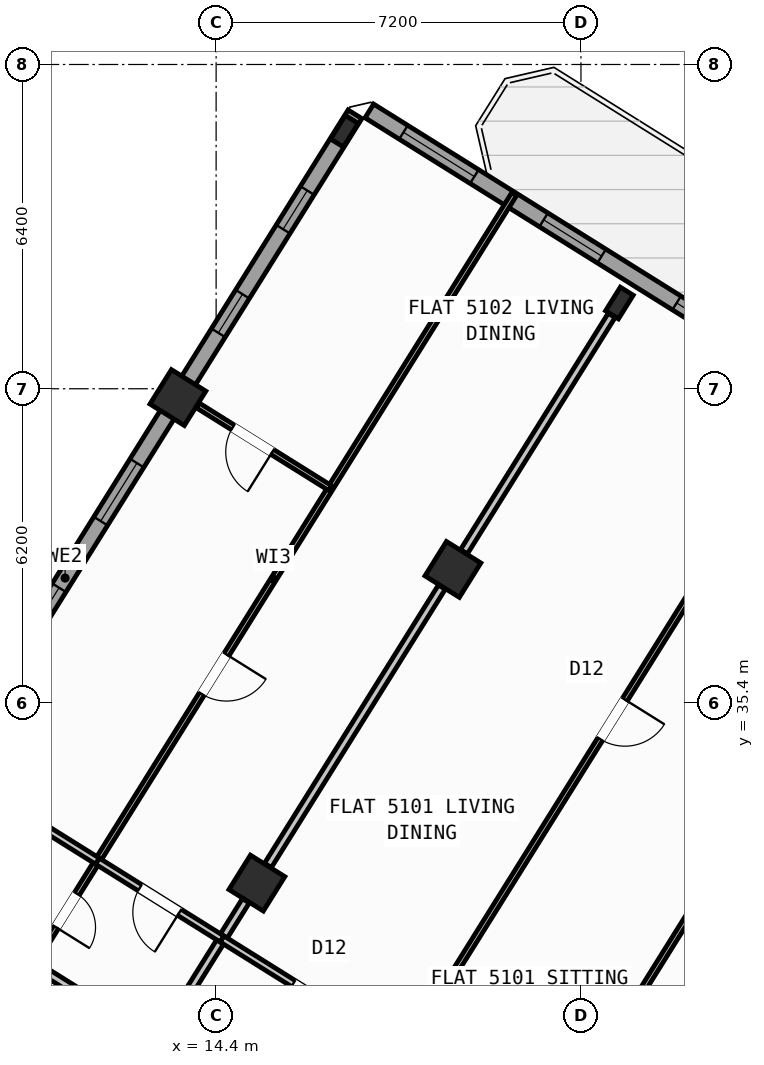
"""IFC4 building model, lengths in metres.
Left out: names, types, materials, properties, quantities, classifications, styles, units other than length and angle.
Written with IfcOpenShell. Run it as: python <this file> out.ifc"""

import sys

from ifc_helpers import new_model, si_unit, direction, frame, frame_2d, origin, origin_2d, place, context, subcontext, project, spatial, rectangle, hollow_rectangle, i_section, extrude, source, transform, mapped, element, fill, save


model = new_model("IFC4")
c1 = context("Model", 3, precision=1e-05, world=origin(), true_north=direction((0.0, 1.0)))
c2 = subcontext(c1, "Body", "Model", "MODEL_VIEW")
j1 = project(units=[si_unit("LENGTHUNIT", "METRE"), si_unit("PLANEANGLEUNIT", "RADIAN")], contexts=[c1])
p1 = place(None, origin())
s1 = spatial("IfcSite", under=j1, at=p1, CompositionType="ELEMENT")
p2 = place(p1, origin())
s2 = spatial("IfcBuilding", under=s1, at=p2, CompositionType="ELEMENT")
p3 = place(p2, frame((0.0, 0.0, 204.0)))
s3 = spatial("IfcBuildingStorey", under=s2, at=p3, CompositionType="ELEMENT", Elevation=204.0)
m1 = source(origin(), c2, "Body", "SweptSolid", [
    extrude(i_section(OverallWidth=0.3, OverallDepth=0.55, WebThickness=0.015, FlangeThickness=0.029, at=origin_2d()), origin(), (0.0, 0.0, 1.0), 3.6),
])
p4 = place(p3, frame((22.358, 43.292, 0.0), z_axis=(0.0, 0.0, 1.0), x_axis=(-0.848048096156, 0.529919264233, 0.0)))
e1 = element("IfcColumn", 1, at=p4, inside=s3, PredefinedType="COLUMN", context=c2, shape_type="MappedRepresentation", body=[
    mapped(m1, transform((0.0, 0.0, 0.0), scale=1.0)),
])
m2 = source(origin(), c2, "Body", "SweptSolid", [
    extrude(hollow_rectangle(XDim=0.8, YDim=0.8, WallThickness=0.032, at=origin_2d()), origin(), (0.0, 0.0, 1.0), 3.6),
])
for number, where, z_axis, x_axis in (
    (2, (19.073, 38.034, 0.0), (0.0, 0.0, 1.0), (-0.848, 0.53, 0.0)),
    (3, (15.205, 31.844, 0.0), (0.0, 0.0, 1.0), (-0.848, 0.53, 0.0)),
):
    element("IfcColumn", number, at=place(p3, frame(where, z_axis=z_axis, x_axis=x_axis)), inside=s3, PredefinedType="COLUMN", context=c2, shape_type="MappedRepresentation", body=[
        mapped(m2, transform((0.0, 0.0, 0.0), scale=1.0)),
    ])
p5 = place(p3, frame((16.931, 46.684, 0.0), z_axis=(0.0, 0.0, 1.0), x_axis=(-0.848048096156, 0.529919264233, 0.0)))
e4 = element("IfcColumn", 4, at=p5, inside=s3, PredefinedType="COLUMN", context=c2, shape_type="MappedRepresentation", body=[
    mapped(m1, transform((0.0, 0.0, 0.0), scale=1.0)),
])
p6 = place(p3, frame((13.646, 41.426, 0.0), z_axis=(0.0, 0.0, 1.0), x_axis=(-0.848048096156, 0.529919264233, 0.0)))
e5 = element("IfcColumn", 5, at=p6, inside=s3, PredefinedType="COLUMN", context=c2, shape_type="MappedRepresentation", body=[
    mapped(m2, transform((0.0, 0.0, 0.0), scale=1.0)),
])
p7 = place(p3, frame((5.7, 28.71, 0.0), z_axis=(0.0, 0.0, 1.0), x_axis=(0.529923711467, 0.8480453172, 0.0)))
e6 = element("IfcWall", 6, at=p7, inside=s3, PredefinedType="STANDARD", context=c2, shape_type="SweptSolid", body=[
    extrude(rectangle(XDim=21.587, YDim=0.32, at=frame_2d((10.794, 0.0))), origin(), (0.0, 0.0, 1.0), 2.825),
])
p8 = place(p7, frame((4.749, 0.0, 1.0)))
e7 = element("IfcOpeningElement", 7, at=p8, cuts=e6, PredefinedType="OPENING", context=c2, shape_type="SweptSolid", body=[
    extrude(rectangle(XDim=0.9, YDim=1.25, at=frame_2d((0.45, 0.625))), frame((0.0, 0.17, 0.0), z_axis=(0.0, -1.0, 0.0), x_axis=(1.0, 0.0, 0.0)), (0.0, 0.0, 1.0), 0.34),
])
p9 = place(p7, frame((9.219, 0.0, 0.9)))
e8 = element("IfcOpeningElement", 8, at=p9, cuts=e6, PredefinedType="OPENING", context=c2, shape_type="SweptSolid", body=[
    extrude(rectangle(XDim=1.35, YDim=1.45, at=frame_2d((0.675, 0.725))), frame((0.0, 0.17, 0.0), z_axis=(0.0, -1.0, 0.0), x_axis=(1.0, 0.0, 0.0)), (0.0, 0.0, 1.0), 0.34),
])
p10 = place(p7, frame((12.119, 0.0, 0.9)))
e9 = element("IfcOpeningElement", 9, at=p10, cuts=e6, PredefinedType="OPENING", context=c2, shape_type="SweptSolid", body=[
    extrude(rectangle(XDim=1.35, YDim=1.45, at=frame_2d((0.675, 0.725))), frame((0.0, 0.17, 0.0), z_axis=(0.0, -1.0, 0.0), x_axis=(1.0, 0.0, 0.0)), (0.0, 0.0, 1.0), 0.34),
])
p11 = place(p7, frame((16.5, 0.0, 1.0)))
e10 = element("IfcOpeningElement", 10, at=p11, cuts=e6, PredefinedType="OPENING", context=c2, shape_type="SweptSolid", body=[
    extrude(rectangle(XDim=0.9, YDim=1.25, at=frame_2d((0.45, 0.625))), frame((0.0, 0.17, 0.0), z_axis=(0.0, -1.0, 0.0), x_axis=(1.0, 0.0, 0.0)), (0.0, 0.0, 1.0), 0.34),
])
p12 = place(p7, frame((18.913, 0.0, 1.0)))
e11 = element("IfcOpeningElement", 11, at=p12, cuts=e6, PredefinedType="OPENING", context=c2, shape_type="SweptSolid", body=[
    extrude(rectangle(XDim=0.9, YDim=1.25, at=frame_2d((0.45, 0.625))), frame((0.0, 0.17, 0.0), z_axis=(0.0, -1.0, 0.0), x_axis=(1.0, 0.0, 0.0)), (0.0, 0.0, 1.0), 0.34),
])
p13 = place(p3, frame((17.424, 47.083, 0.0), z_axis=(0.0, 0.0, 1.0), x_axis=(0.848049927979, -0.529916332693, 0.0)))
e12 = element("IfcWall", 12, at=p13, inside=s3, PredefinedType="STANDARD", context=c2, shape_type="SweptSolid", body=[
    extrude(rectangle(XDim=29.223, YDim=0.32, at=frame_2d((14.612, 0.0))), origin(), (0.0, 0.0, 1.0), 3.35),
])
p14 = place(p13, frame((8.799, 0.0, 0.0)))
e13 = element("IfcOpeningElement", 13, at=p14, cuts=e12, PredefinedType="OPENING", context=c2, shape_type="SweptSolid", body=[
    extrude(rectangle(XDim=1.05, YDim=2.15, at=frame_2d((0.525, 1.075))), frame((0.0, 0.17, 0.0), z_axis=(0.0, -1.0, 0.0), x_axis=(1.0, 0.0, 0.0)), (0.0, 0.0, 1.0), 0.34),
])
p15 = place(p13, frame((0.794, 0.0, 0.9)))
e14 = element("IfcOpeningElement", 14, at=p15, cuts=e12, PredefinedType="OPENING", context=c2, shape_type="SweptSolid", body=[
    extrude(rectangle(XDim=1.65, YDim=1.45, at=frame_2d((0.825, 0.725))), frame((0.0, 0.17, 0.0), z_axis=(0.0, -1.0, 0.0), x_axis=(1.0, 0.0, 0.0)), (0.0, 0.0, 1.0), 0.34),
])
p16 = place(p13, frame((4.056, 0.0, 0.9)))
e15 = element("IfcOpeningElement", 15, at=p16, cuts=e12, PredefinedType="OPENING", context=c2, shape_type="SweptSolid", body=[
    extrude(rectangle(XDim=1.35, YDim=1.45, at=frame_2d((0.675, 0.725))), frame((0.0, 0.17, 0.0), z_axis=(0.0, -1.0, 0.0), x_axis=(1.0, 0.0, 0.0)), (0.0, 0.0, 1.0), 0.34),
])
p17 = place(p13, frame((7.151, 0.0, 1.0)))
e16 = element("IfcOpeningElement", 16, at=p17, cuts=e12, PredefinedType="OPENING", context=c2, shape_type="SweptSolid", body=[
    extrude(rectangle(XDim=0.9, YDim=1.25, at=frame_2d((0.45, 0.625))), frame((0.0, 0.17, 0.0), z_axis=(0.0, -1.0, 0.0), x_axis=(1.0, 0.0, 0.0)), (0.0, 0.0, 1.0), 0.34),
])
p18 = place(p13, frame((14.612, 0.0, 1.0)))
e17 = element("IfcOpeningElement", 17, at=p18, cuts=e12, PredefinedType="OPENING", context=c2, shape_type="SweptSolid", body=[
    extrude(rectangle(XDim=0.9, YDim=1.25, at=frame_2d((0.45, 0.625))), frame((0.0, 0.17, 0.0), z_axis=(0.0, -1.0, 0.0), x_axis=(1.0, 0.0, 0.0)), (0.0, 0.0, 1.0), 0.34),
])
p19 = place(p13, frame((17.254, 0.0, 1.0)))
e18 = element("IfcOpeningElement", 18, at=p19, cuts=e12, PredefinedType="OPENING", context=c2, shape_type="SweptSolid", body=[
    extrude(rectangle(XDim=0.9, YDim=1.25, at=frame_2d((0.45, 0.625))), frame((0.0, 0.17, 0.0), z_axis=(0.0, -1.0, 0.0), x_axis=(1.0, 0.0, 0.0)), (0.0, 0.0, 1.0), 0.34),
])
p20 = place(p13, frame((21.139, 0.0, 0.9)))
e19 = element("IfcOpeningElement", 19, at=p20, cuts=e12, PredefinedType="OPENING", context=c2, shape_type="SweptSolid", body=[
    extrude(rectangle(XDim=1.35, YDim=1.45, at=frame_2d((0.675, 0.725))), frame((0.0, 0.17, 0.0), z_axis=(0.0, -1.0, 0.0), x_axis=(1.0, 0.0, 0.0)), (0.0, 0.0, 1.0), 0.34),
])
p21 = place(p13, frame((25.778, 0.0, 0.9)))
e20 = element("IfcOpeningElement", 20, at=p21, cuts=e12, PredefinedType="OPENING", context=c2, shape_type="SweptSolid", body=[
    extrude(rectangle(XDim=1.35, YDim=1.45, at=frame_2d((0.675, 0.725))), frame((0.0, 0.17, 0.0), z_axis=(0.0, -1.0, 0.0), x_axis=(1.0, 0.0, 0.0)), (0.0, 0.0, 1.0), 0.34),
])
p22 = place(p3, frame((31.239, 38.274, 0.0), z_axis=(0.0, 0.0, 1.0), x_axis=(-0.529918119251, -0.84804881162, 0.0)))
e21 = element("IfcWall", 21, at=p22, inside=s3, PredefinedType="PARTITIONING", context=c2, shape_type="SweptSolid", body=[
    extrude(rectangle(XDim=17.65, YDim=0.16, at=frame_2d((8.825, 0.0))), origin(), (0.0, 0.0, 1.0), 3.34),
])
p23 = place(p3, frame((21.885, 23.306, 0.0), z_axis=(0.0, 0.0, 1.0), x_axis=(-0.848052408131, 0.529912363569, 0.0)))
e22 = element("IfcWall", 22, at=p23, inside=s3, PredefinedType="PARTITIONING", context=c2, shape_type="SweptSolid", body=[
    extrude(rectangle(XDim=16.73, YDim=0.16, at=frame_2d((8.365, 0.0))), origin(), (0.0, 0.0, 1.0), 3.34),
])
p24 = place(p23, frame((7.57, 0.0, 0.0)))
e23 = element("IfcOpeningElement", 23, at=p24, cuts=e22, PredefinedType="OPENING", context=c2, shape_type="SweptSolid", body=[
    extrude(rectangle(XDim=1.0, YDim=2.1, at=frame_2d((0.5, 1.05))), frame((0.0, 0.09, 0.0), z_axis=(0.0, -1.0, 0.0), x_axis=(1.0, 0.0, 0.0)), (0.0, 0.0, 1.0), 0.18),
])
p25 = place(p23, frame((11.14, 0.0, 0.0)))
e24 = element("IfcOpeningElement", 24, at=p25, cuts=e22, PredefinedType="OPENING", context=c2, shape_type="SweptSolid", body=[
    extrude(rectangle(XDim=1.0, YDim=2.1, at=frame_2d((0.5, 1.05))), frame((0.0, 0.09, 0.0), z_axis=(0.0, -1.0, 0.0), x_axis=(1.0, 0.0, 0.0)), (0.0, 0.0, 1.0), 0.18),
])
p26 = place(p3, frame((20.719, 21.44, 0.0), z_axis=(0.0, 0.0, 1.0), x_axis=(-0.848048310262, 0.529918921593, 0.0)))
e25 = element("IfcWall", 25, at=p26, inside=s3, PredefinedType="PARTITIONING", context=c2, shape_type="SweptSolid", body=[
    extrude(rectangle(XDim=16.73, YDim=0.16, at=frame_2d((8.365, 0.0))), origin(), (0.0, 0.0, 1.0), 3.34),
])
p27 = place(p26, frame((1.505, 0.0, 0.0)))
e26 = element("IfcOpeningElement", 26, at=p27, cuts=e25, PredefinedType="OPENING", context=c2, shape_type="SweptSolid", body=[
    extrude(rectangle(XDim=1.0, YDim=2.1, at=frame_2d((0.5, 1.05))), frame((0.0, 0.09, 0.0), z_axis=(0.0, -1.0, 0.0), x_axis=(1.0, 0.0, 0.0)), (0.0, 0.0, 1.0), 0.18),
])
p28 = place(p26, frame((6.435, 0.0, 0.0)))
e27 = element("IfcOpeningElement", 27, at=p28, cuts=e25, PredefinedType="OPENING", context=c2, shape_type="SweptSolid", body=[
    extrude(rectangle(XDim=1.0, YDim=2.1, at=frame_2d((0.5, 1.05))), frame((0.0, 0.09, 0.0), z_axis=(0.0, -1.0, 0.0), x_axis=(1.0, 0.0, 0.0)), (0.0, 0.0, 1.0), 0.18),
])
p29 = place(p26, frame((12.784, 0.0, 0.0)))
e28 = element("IfcOpeningElement", 28, at=p29, cuts=e25, PredefinedType="OPENING", context=c2, shape_type="SweptSolid", body=[
    extrude(rectangle(XDim=1.0, YDim=2.1, at=frame_2d((0.5, 1.05))), frame((0.0, 0.09, 0.0), z_axis=(0.0, -1.0, 0.0), x_axis=(1.0, 0.0, 0.0)), (0.0, 0.0, 1.0), 0.18),
])
p30 = place(p3, frame((22.206, 43.049, 0.0), z_axis=(0.0, 0.0, 1.0), x_axis=(-0.529919150083, -0.848048167486, 0.0)))
e29 = element("IfcWall", 29, at=p30, inside=s3, PredefinedType="PARTITIONING", context=c2, shape_type="SweptSolid", body=[
    extrude(rectangle(XDim=5.501, YDim=0.16, at=frame_2d((2.75, 0.0))), origin(), (0.0, 0.0, 1.0), 2.825),
])
p31 = place(p3, frame((18.854, 37.685, 0.0), z_axis=(0.0, 0.0, 1.0), x_axis=(-0.529907440938, -0.848055484057, 0.0)))
e30 = element("IfcWall", 30, at=p31, inside=s3, PredefinedType="PARTITIONING", context=c2, shape_type="SweptSolid", body=[
    extrude(rectangle(XDim=6.476, YDim=0.16, at=frame_2d((3.238, 0.0))), origin(), (0.0, 0.0, 1.0), 2.825),
])
p32 = place(p3, frame((14.986, 31.494, 0.0), z_axis=(0.0, 0.0, 1.0), x_axis=(-0.529885466561, -0.848069214349, 0.0)))
e31 = element("IfcWall", 31, at=p32, inside=s3, PredefinedType="PARTITIONING", context=c2, shape_type="SweptSolid", body=[
    extrude(rectangle(XDim=3.288, YDim=0.16, at=frame_2d((1.644, 0.0))), origin(), (0.0, 0.0, 1.0), 2.825),
])
p33 = place(p3, frame((26.336, 41.656, 0.0), z_axis=(0.0, 0.0, 1.0), x_axis=(-0.529916887708, -0.848049581169, 0.0)))
e32 = element("IfcWall", 32, at=p33, inside=s3, PredefinedType="PARTITIONING", context=c2, shape_type="SweptSolid", body=[
    extrude(rectangle(XDim=17.92, YDim=0.11, at=frame_2d((8.96, 0.0))), origin(), (0.0, 0.0, 1.0), 2.995),
])
p34 = place(p33, frame((16.28, 0.0, 0.0)))
e33 = element("IfcOpeningElement", 33, at=p34, cuts=e32, PredefinedType="OPENING", context=c2, shape_type="SweptSolid", body=[
    extrude(rectangle(XDim=0.78, YDim=2.05, at=frame_2d((0.39, 1.025))), frame((0.0, 0.065, 0.0), z_axis=(0.0, -1.0, 0.0), x_axis=(1.0, 0.0, 0.0)), (0.0, 0.0, 1.0), 0.13),
])
p35 = place(p33, frame((7.3, 0.0, 0.0)))
e34 = element("IfcOpeningElement", 34, at=p35, cuts=e32, PredefinedType="OPENING", context=c2, shape_type="SweptSolid", body=[
    extrude(rectangle(XDim=0.92, YDim=2.08, at=frame_2d((0.46, 1.04))), frame((0.0, 0.065, 0.0), z_axis=(0.0, -1.0, 0.0), x_axis=(1.0, 0.0, 0.0)), (0.0, 0.0, 1.0), 0.13),
])
p36 = place(p3, frame((18.111, 28.494, 0.0), z_axis=(0.0, 0.0, 1.0), x_axis=(-0.848024181217, 0.529957534215, 0.0)))
e35 = element("IfcWall", 35, at=p36, inside=s3, PredefinedType="PLUMBINGWALL", context=c2, shape_type="SweptSolid", body=[
    extrude(rectangle(XDim=4.24, YDim=0.14, at=frame_2d((2.12, 0.0))), origin(), (0.0, 0.0, 1.0), 3.34),
])
p37 = place(p36, frame((1.66, 0.0, 0.0)))
e36 = element("IfcOpeningElement", 36, at=p37, cuts=e35, PredefinedType="OPENING", context=c2, shape_type="SweptSolid", body=[
    extrude(rectangle(XDim=0.92, YDim=2.08, at=frame_2d((0.46, 1.04))), frame((0.0, 0.08, 0.0), z_axis=(0.0, -1.0, 0.0), x_axis=(1.0, 0.0, 0.0)), (0.0, 0.0, 1.0), 0.16),
])
p38 = place(p3, frame((29.161, 39.89, 0.0), z_axis=(0.0, 0.0, 1.0), x_axis=(-0.529915512424, -0.848050440535, 0.0)))
e37 = element("IfcWall", 37, at=p38, inside=s3, PredefinedType="PARTITIONING", context=c2, shape_type="SweptSolid", body=[
    extrude(rectangle(XDim=15.52, YDim=0.11, at=frame_2d((7.76, 0.0))), origin(), (0.0, 0.0, 1.0), 3.34),
])
p39 = place(p38, frame((7.345, 0.0, 0.0)))
e38 = element("IfcOpeningElement", 38, at=p39, cuts=e37, PredefinedType="OPENING", context=c2, shape_type="SweptSolid", body=[
    extrude(rectangle(XDim=0.92, YDim=2.08, at=frame_2d((0.46, 1.04))), frame((0.0, 0.065, 0.0), z_axis=(0.0, -1.0, 0.0), x_axis=(1.0, 0.0, 0.0)), (0.0, 0.0, 1.0), 0.13),
])
p40 = place(p3, frame((20.281, 45.44, 0.0), z_axis=(0.0, 0.0, 1.0), x_axis=(-0.529916887708, -0.848049581169, 0.0)))
e39 = element("IfcWall", 39, at=p40, inside=s3, PredefinedType="PARTITIONING", context=c2, shape_type="SweptSolid", body=[
    extrude(rectangle(XDim=17.92, YDim=0.11, at=frame_2d((8.96, 0.0))), origin(), (0.0, 0.0, 1.0), 3.34),
])
p41 = place(p40, frame((16.28, 0.0, 0.0)))
e40 = element("IfcOpeningElement", 40, at=p41, cuts=e39, PredefinedType="OPENING", context=c2, shape_type="SweptSolid", body=[
    extrude(rectangle(XDim=0.78, YDim=2.05, at=frame_2d((0.39, 1.025))), frame((0.0, 0.065, 0.0), z_axis=(0.0, -1.0, 0.0), x_axis=(1.0, 0.0, 0.0)), (0.0, 0.0, 1.0), 0.13),
])
p42 = place(p40, frame((10.711, 0.0, 0.0)))
e41 = element("IfcOpeningElement", 41, at=p42, cuts=e39, PredefinedType="OPENING", context=c2, shape_type="SweptSolid", body=[
    extrude(rectangle(XDim=0.92, YDim=2.08, at=frame_2d((0.46, 1.04))), frame((0.0, 0.065, 0.0), z_axis=(0.0, -1.0, 0.0), x_axis=(1.0, 0.0, 0.0)), (0.0, 0.0, 1.0), 0.13),
])
p43 = place(p3, frame((14.516, 30.741, 0.0), z_axis=(0.0, 0.0, 1.0), x_axis=(-0.848059786386, 0.529900555496, 0.0)))
e42 = element("IfcWall", 42, at=p43, inside=s3, PredefinedType="PLUMBINGWALL", context=c2, shape_type="SweptSolid", body=[
    extrude(rectangle(XDim=2.9, YDim=0.14, at=frame_2d((1.45, 0.0))), origin(), (0.0, 0.0, 1.0), 3.34),
])
p44 = place(p43, frame((0.99, 0.0, 0.0)))
e43 = element("IfcOpeningElement", 43, at=p44, cuts=e42, PredefinedType="OPENING", context=c2, shape_type="SweptSolid", body=[
    extrude(rectangle(XDim=0.92, YDim=2.08, at=frame_2d((0.46, 1.04))), frame((0.0, 0.08, 0.0), z_axis=(0.0, -1.0, 0.0), x_axis=(1.0, 0.0, 0.0)), (0.0, 0.0, 1.0), 0.16),
])
p45 = place(p3, frame((12.056, 32.278, 0.0), z_axis=(0.0, 0.0, 1.0), x_axis=(-0.848039976902, 0.529932257535, 0.0)))
e44 = element("IfcWall", 44, at=p45, inside=s3, PredefinedType="PLUMBINGWALL", context=c2, shape_type="SweptSolid", body=[
    extrude(rectangle(XDim=3.62, YDim=0.14, at=frame_2d((1.81, 0.0))), origin(), (0.0, 0.0, 1.0), 3.34),
])
p46 = place(p3, frame((16.654, 39.636, 0.0), z_axis=(0.0, 0.0, 1.0), x_axis=(-0.848060484804, 0.529899437736, 0.0)))
e45 = element("IfcWall", 45, at=p46, inside=s3, PredefinedType="PARTITIONING", context=c2, shape_type="SweptSolid", body=[
    extrude(rectangle(XDim=3.088, YDim=0.11, at=frame_2d((1.544, 0.0))), origin(), (0.0, 0.0, 1.0), 2.825),
])
p47 = place(p46, frame((1.35, 0.0, 0.0)))
e46 = element("IfcOpeningElement", 46, at=p47, cuts=e45, PredefinedType="OPENING", context=c2, shape_type="SweptSolid", body=[
    extrude(rectangle(XDim=0.92, YDim=2.08, at=frame_2d((0.46, 1.04))), frame((0.0, 0.065, 0.0), z_axis=(0.0, -1.0, 0.0), x_axis=(1.0, 0.0, 0.0)), (0.0, 0.0, 1.0), 0.13),
])
m3 = source(origin(), c2, "Body", "SweptSolid", [
    extrude(rectangle(XDim=1.35, YDim=1.45, at=frame_2d((0.675, 0.725))), frame((0.0, 0.03, 0.0), z_axis=(0.0, -1.0, 0.0), x_axis=(1.0, 0.0, 0.0)), (0.0, 0.0, 1.0), 0.06),
])
p48 = place(p9, origin())
e47 = element("IfcWindow", 47, at=p48, inside=s3, PartitioningType="SINGLE_PANEL", PredefinedType="WINDOW", context=c2, shape_type="MappedRepresentation", body=[
    mapped(m3, transform((0.0, 0.0, 0.0), scale=1.0)),
])
fill(e8, e47)
p49 = place(p10, origin())
e48 = element("IfcWindow", 48, at=p49, inside=s3, PartitioningType="SINGLE_PANEL", PredefinedType="WINDOW", context=c2, shape_type="MappedRepresentation", body=[
    mapped(m3, transform((0.0, 0.0, 0.0), scale=1.0)),
])
fill(e9, e48)
m4 = source(origin(), c2, "Body", "SweptSolid", [
    extrude(rectangle(XDim=0.9, YDim=1.25, at=frame_2d((0.45, 0.625))), frame((0.0, 0.03, 0.0), z_axis=(0.0, -1.0, 0.0), x_axis=(1.0, 0.0, 0.0)), (0.0, 0.0, 1.0), 0.06),
])
p50 = place(p11, origin())
e49 = element("IfcWindow", 49, at=p50, inside=s3, PartitioningType="SINGLE_PANEL", PredefinedType="WINDOW", context=c2, shape_type="MappedRepresentation", body=[
    mapped(m4, transform((0.0, 0.0, 0.0), scale=1.0)),
])
fill(e10, e49)
p51 = place(p12, origin())
e50 = element("IfcWindow", 50, at=p51, inside=s3, PartitioningType="SINGLE_PANEL", PredefinedType="WINDOW", context=c2, shape_type="MappedRepresentation", body=[
    mapped(m4, transform((0.0, 0.0, 0.0), scale=1.0)),
])
fill(e11, e50)
m5 = source(origin(), c2, "Body", "SweptSolid", [
    extrude(rectangle(XDim=1.65, YDim=1.45, at=frame_2d((0.825, 0.725))), frame((0.0, 0.03, 0.0), z_axis=(0.0, -1.0, 0.0), x_axis=(1.0, 0.0, 0.0)), (0.0, 0.0, 1.0), 0.06),
])
p52 = place(p15, origin())
e51 = element("IfcWindow", 51, at=p52, inside=s3, PartitioningType="SINGLE_PANEL", PredefinedType="WINDOW", context=c2, shape_type="MappedRepresentation", body=[
    mapped(m5, transform((0.0, 0.0, 0.0), scale=1.0)),
])
fill(e14, e51)
p53 = place(p16, origin())
e52 = element("IfcWindow", 52, at=p53, inside=s3, PartitioningType="SINGLE_PANEL", PredefinedType="WINDOW", context=c2, shape_type="MappedRepresentation", body=[
    mapped(m3, transform((0.0, 0.0, 0.0), scale=1.0)),
])
fill(e15, e52)
p54 = place(p17, origin())
e53 = element("IfcWindow", 53, at=p54, inside=s3, PartitioningType="SINGLE_PANEL", PredefinedType="WINDOW", context=c2, shape_type="MappedRepresentation", body=[
    mapped(m4, transform((0.0, 0.0, 0.0), scale=1.0)),
])
fill(e16, e53)
m6 = source(origin(), c2, "Body", "SweptSolid", [
    extrude(rectangle(XDim=0.92, YDim=2.08, at=frame_2d((0.46, 1.04))), frame((0.0, 0.025, 0.0), z_axis=(0.0, -1.0, 0.0), x_axis=(1.0, 0.0, 0.0)), (0.0, 0.0, 1.0), 0.05),
])
p55 = place(p37, origin())
e54 = element("IfcDoor", 54, at=p55, inside=s3, OperationType="SINGLE_SWING_LEFT", PredefinedType="DOOR", context=c2, shape_type="MappedRepresentation", body=[
    mapped(m6, transform((0.0, 0.0, 0.0), scale=1.0)),
])
fill(e36, e54)
p56 = place(p35, origin())
e55 = element("IfcDoor", 55, at=p56, inside=s3, OperationType="SINGLE_SWING_LEFT", PredefinedType="DOOR", context=c2, shape_type="MappedRepresentation", body=[
    mapped(m6, transform((0.0, 0.0, 0.0), scale=1.0)),
])
fill(e34, e55)
p57 = place(p44, origin())
e56 = element("IfcDoor", 56, at=p57, inside=s3, OperationType="SINGLE_SWING_LEFT", PredefinedType="DOOR", context=c2, shape_type="MappedRepresentation", body=[
    mapped(m6, transform((0.0, 0.0, 0.0), scale=1.0)),
])
fill(e43, e56)
m7 = source(origin(), c2, "Body", "SweptSolid", [
    extrude(rectangle(XDim=0.78, YDim=2.05, at=frame_2d((0.39, 1.025))), frame((0.0, 0.025, 0.0), z_axis=(0.0, -1.0, 0.0), x_axis=(1.0, 0.0, 0.0)), (0.0, 0.0, 1.0), 0.05),
])
p58 = place(p41, origin())
e57 = element("IfcDoor", 57, at=p58, inside=s3, OperationType="SINGLE_SWING_RIGHT", PredefinedType="DOOR", context=c2, shape_type="MappedRepresentation", body=[
    mapped(m7, transform((0.0, 0.0, 0.0), scale=1.0)),
])
fill(e40, e57)
p59 = place(p42, origin())
e58 = element("IfcDoor", 58, at=p59, inside=s3, OperationType="SINGLE_SWING_LEFT", PredefinedType="DOOR", context=c2, shape_type="MappedRepresentation", body=[
    mapped(m6, transform((0.0, 0.0, 0.0), scale=1.0)),
])
fill(e41, e58)
p60 = place(p47, origin())
e59 = element("IfcDoor", 59, at=p60, inside=s3, OperationType="SINGLE_SWING_LEFT", PredefinedType="DOOR", context=c2, shape_type="MappedRepresentation", body=[
    mapped(m6, transform((0.0, 0.0, 0.0), scale=1.0)),
])
fill(e46, e59)
save(model, sys.argv[1])
